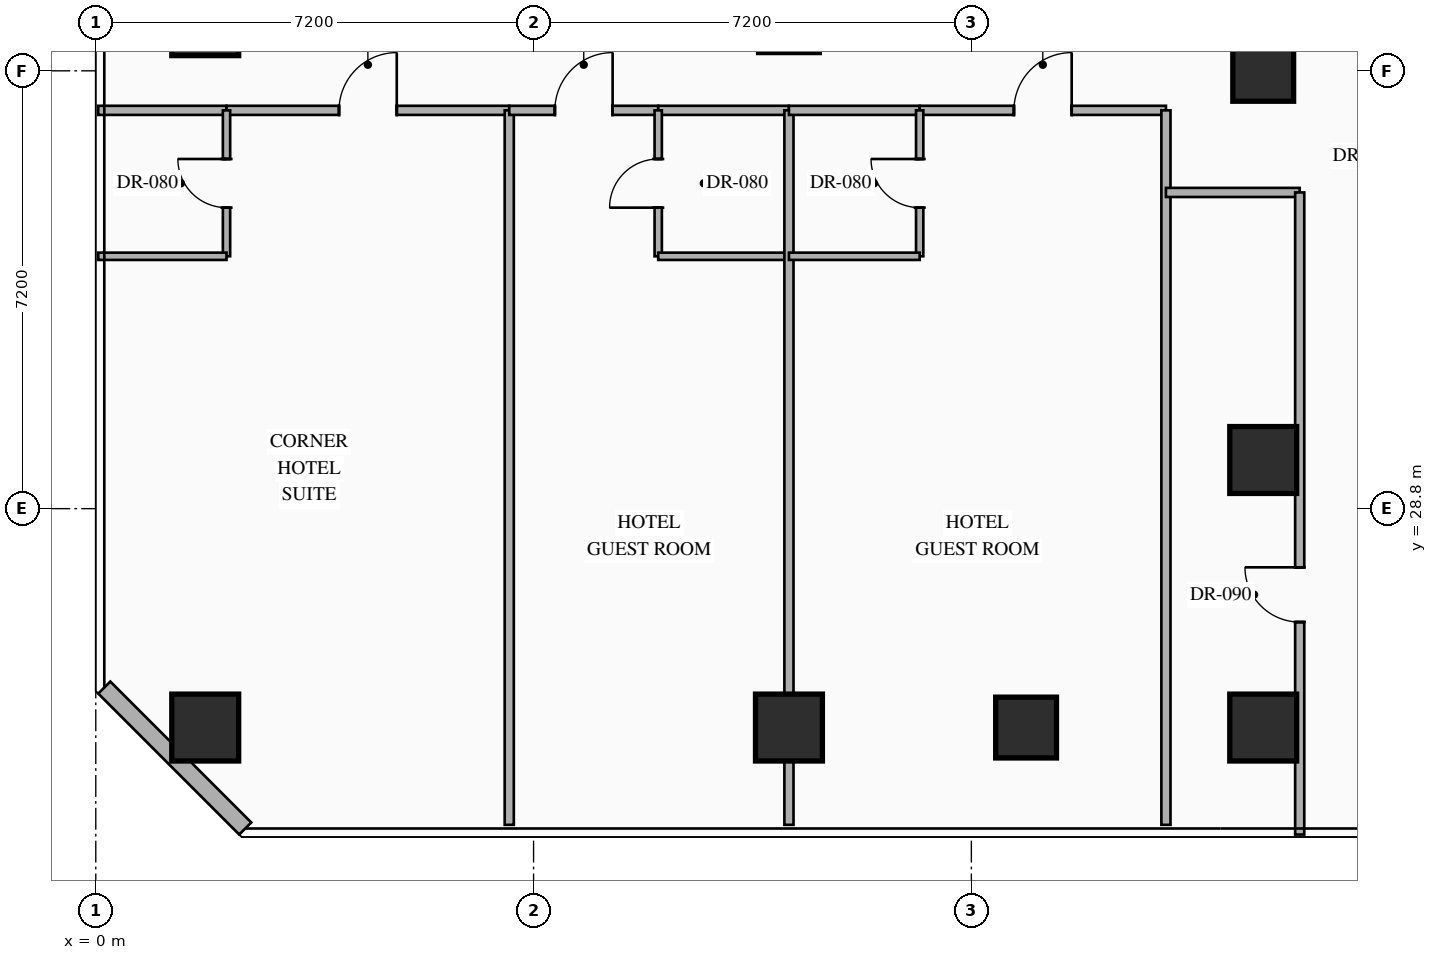
"""IFC4 building model, lengths in metres.
Left out: names, types, materials, properties, quantities, classifications, styles, units other than length and angle.
Written with IfcOpenShell. Run it as: python <this file> out.ifc"""

import sys

from ifc_helpers import new_model, si_unit, direction, frame, frame_2d, origin, origin_2d, place, context, subcontext, project, spatial, rectangle, hollow_rectangle, extrude, element, fill, save


model = new_model("IFC4")
c1 = context("Model", 3, precision=1e-05, world=origin(), true_north=direction((0.0, 1.0)))
c2 = subcontext(c1, "Body", "Model", "MODEL_VIEW")
j1 = project(units=[si_unit("LENGTHUNIT", "METRE"), si_unit("PLANEANGLEUNIT", "RADIAN")], contexts=[c1])
p1 = place(None, origin())
s1 = spatial("IfcSite", under=j1, at=p1, CompositionType="ELEMENT")
p2 = place(p1, origin())
s2 = spatial("IfcBuilding", under=s1, at=p2, CompositionType="ELEMENT")
p3 = place(p2, frame((0.0, 0.0, 63.4)))
s3 = spatial("IfcBuildingStorey", under=s2, at=p3, CompositionType="ELEMENT", Elevation=63.4)
for number, where, z_axis, x_axis in (
    (1, (1.8, 25.2, 0.0), (0.0, 0.0, 1.0), (1.0, 0.0, 0.0)),
    (2, (1.8, 36.8, 0.0), (0.0, 0.0, 1.0), (1.0, 0.0, 0.0)),
    (3, (11.4, 25.2, 0.0), (0.0, 0.0, 1.0), (1.0, 0.0, 0.0)),
    (4, (19.2, 25.2, 0.0), (0.0, 0.0, 1.0), (1.0, 0.0, 0.0)),
    (5, (19.2, 29.6, 0.0), (0.0, 0.0, 1.0), (1.0, 0.0, 0.0)),
):
    element("IfcColumn", number, at=place(p3, frame(where, z_axis=z_axis, x_axis=x_axis)), inside=s3, PredefinedType="COLUMN", context=c2, shape_type="SweptSolid", body=[
        extrude(hollow_rectangle(XDim=1.1, YDim=1.1, WallThickness=0.04, at=origin_2d()), origin(), (0.0, 0.0, 1.0), 3.35),
    ])
for number, where, z_axis, x_axis in (
    (6, (19.2, 36.0, 0.0), (0.0, 0.0, 1.0), (1.0, 0.0, 0.0)),
    (7, (15.3, 25.2, 0.0), (0.0, 0.0, 1.0), (1.0, 0.0, 0.0)),
):
    element("IfcColumn", number, at=place(p3, frame(where, z_axis=z_axis, x_axis=x_axis)), inside=s3, PredefinedType="COLUMN", context=c2, shape_type="SweptSolid", body=[
        extrude(hollow_rectangle(XDim=1.0, YDim=1.0, WallThickness=0.038, at=origin_2d()), origin(), (0.0, 0.0, 1.0), 3.35),
    ])
p4 = place(p3, frame((2.458, 23.54, 0.0), z_axis=(0.0, 0.0, 1.0), x_axis=(-0.707144017911, 0.707069542501, 0.0)))
e8 = element("IfcWall", 8, at=p4, inside=s3, PredefinedType="STANDARD", context=c2, shape_type="SweptSolid", body=[
    extrude(rectangle(XDim=3.278, YDim=0.28, at=frame_2d((1.639, 0.0))), origin(), (0.0, 0.0, 1.0), 3.13),
])
p5 = place(p3, frame((0.04, 35.35, 0.0), z_axis=(0.0, 0.0, 1.0), x_axis=(1.0, 0.0, 0.0)))
e9 = element("IfcWall", 9, at=p5, inside=s3, PredefinedType="PARTITIONING", context=c2, shape_type="SweptSolid", body=[
    extrude(rectangle(XDim=2.11, YDim=0.15, at=frame_2d((1.055, 0.0))), origin(), (0.0, 0.0, 1.0), 3.13),
])
p6 = place(p3, frame((2.15, 35.35, 0.0), z_axis=(0.0, 0.0, 1.0), x_axis=(1.0, 0.0, 0.0)))
e10 = element("IfcWall", 10, at=p6, inside=s3, PredefinedType="PARTITIONING", context=c2, shape_type="SweptSolid", body=[
    extrude(rectangle(XDim=4.65, YDim=0.15, at=frame_2d((2.325, 0.0))), origin(), (0.0, 0.0, 1.0), 3.13),
])
p7 = place(p6, frame((1.85, 0.0, 0.0)))
e11 = element("IfcOpeningElement", 11, at=p7, cuts=e10, PredefinedType="OPENING", context=c2, shape_type="SweptSolid", body=[
    extrude(rectangle(XDim=0.95, YDim=2.15, at=frame_2d((0.475, 1.075))), frame((0.0, 0.085, 0.0), z_axis=(0.0, -1.0, 0.0), x_axis=(1.0, 0.0, 0.0)), (0.0, 0.0, 1.0), 0.17),
])
p8 = place(p3, frame((2.15, 32.95, 0.0), z_axis=(0.0, 0.0, 1.0), x_axis=(0.0, 1.0, 0.0)))
e12 = element("IfcWall", 12, at=p8, inside=s3, PredefinedType="PARTITIONING", context=c2, shape_type="SweptSolid", body=[
    extrude(rectangle(XDim=2.4, YDim=0.12, at=frame_2d((1.2, 0.0))), origin(), (0.0, 0.0, 1.0), 3.13),
])
p9 = place(p8, frame((0.8, 0.0, 0.0)))
e13 = element("IfcOpeningElement", 13, at=p9, cuts=e12, PredefinedType="OPENING", context=c2, shape_type="SweptSolid", body=[
    extrude(rectangle(XDim=0.8, YDim=2.06, at=frame_2d((0.4, 1.03))), frame((0.0, 0.07, 0.0), z_axis=(0.0, -1.0, 0.0), x_axis=(1.0, 0.0, 0.0)), (0.0, 0.0, 1.0), 0.14),
])
p10 = place(p3, frame((0.04, 32.95, 0.0), z_axis=(0.0, 0.0, 1.0), x_axis=(1.0, 0.0, 0.0)))
e14 = element("IfcWall", 14, at=p10, inside=s3, PredefinedType="PARTITIONING", context=c2, shape_type="SweptSolid", body=[
    extrude(rectangle(XDim=2.11, YDim=0.12, at=frame_2d((1.055, 0.0))), origin(), (0.0, 0.0, 1.0), 3.13),
])
p11 = place(p3, frame((6.8, 23.6, 0.0), z_axis=(0.0, 0.0, 1.0), x_axis=(0.0, 1.0, 0.0)))
e15 = element("IfcWall", 15, at=p11, inside=s3, PredefinedType="PARTITIONING", context=c2, shape_type="SweptSolid", body=[
    extrude(rectangle(XDim=11.75, YDim=0.15, at=frame_2d((5.875, 0.0))), origin(), (0.0, 0.0, 1.0), 3.13),
])
p12 = place(p3, frame((6.8, 35.35, 0.0), z_axis=(0.0, 0.0, 1.0), x_axis=(1.0, 0.0, 0.0)))
e16 = element("IfcWall", 16, at=p12, inside=s3, PredefinedType="PARTITIONING", context=c2, shape_type="SweptSolid", body=[
    extrude(rectangle(XDim=2.45, YDim=0.15, at=frame_2d((1.225, 0.0))), origin(), (0.0, 0.0, 1.0), 3.13),
])
p13 = place(p12, frame((0.75, 0.0, 0.0)))
e17 = element("IfcOpeningElement", 17, at=p13, cuts=e16, PredefinedType="OPENING", context=c2, shape_type="SweptSolid", body=[
    extrude(rectangle(XDim=0.95, YDim=2.15, at=frame_2d((0.475, 1.075))), frame((0.0, 0.085, 0.0), z_axis=(0.0, -1.0, 0.0), x_axis=(1.0, 0.0, 0.0)), (0.0, 0.0, 1.0), 0.17),
])
p14 = place(p3, frame((9.25, 35.35, 0.0), z_axis=(0.0, 0.0, 1.0), x_axis=(1.0, 0.0, 0.0)))
e18 = element("IfcWall", 18, at=p14, inside=s3, PredefinedType="PARTITIONING", context=c2, shape_type="SweptSolid", body=[
    extrude(rectangle(XDim=2.15, YDim=0.15, at=frame_2d((1.075, 0.0))), origin(), (0.0, 0.0, 1.0), 3.13),
])
p15 = place(p3, frame((9.25, 32.95, 0.0), z_axis=(0.0, 0.0, 1.0), x_axis=(0.0, 1.0, 0.0)))
e19 = element("IfcWall", 19, at=p15, inside=s3, PredefinedType="PARTITIONING", context=c2, shape_type="SweptSolid", body=[
    extrude(rectangle(XDim=2.4, YDim=0.12, at=frame_2d((1.2, 0.0))), origin(), (0.0, 0.0, 1.0), 3.13),
])
p16 = place(p15, frame((0.8, 0.0, 0.0)))
e20 = element("IfcOpeningElement", 20, at=p16, cuts=e19, PredefinedType="OPENING", context=c2, shape_type="SweptSolid", body=[
    extrude(rectangle(XDim=0.8, YDim=2.06, at=frame_2d((0.4, 1.03))), frame((0.0, 0.07, 0.0), z_axis=(0.0, -1.0, 0.0), x_axis=(1.0, 0.0, 0.0)), (0.0, 0.0, 1.0), 0.14),
])
p17 = place(p3, frame((9.25, 32.95, 0.0), z_axis=(0.0, 0.0, 1.0), x_axis=(1.0, 0.0, 0.0)))
e21 = element("IfcWall", 21, at=p17, inside=s3, PredefinedType="PARTITIONING", context=c2, shape_type="SweptSolid", body=[
    extrude(rectangle(XDim=2.15, YDim=0.12, at=frame_2d((1.075, 0.0))), origin(), (0.0, 0.0, 1.0), 3.13),
])
p18 = place(p3, frame((11.4, 23.6, 0.0), z_axis=(0.0, 0.0, 1.0), x_axis=(0.0, 1.0, 0.0)))
e22 = element("IfcWall", 22, at=p18, inside=s3, PredefinedType="PARTITIONING", context=c2, shape_type="SweptSolid", body=[
    extrude(rectangle(XDim=11.75, YDim=0.15, at=frame_2d((5.875, 0.0))), origin(), (0.0, 0.0, 1.0), 2.425),
])
p19 = place(p3, frame((11.4, 35.35, 0.0), z_axis=(0.0, 0.0, 1.0), x_axis=(1.0, 0.0, 0.0)))
e23 = element("IfcWall", 23, at=p19, inside=s3, PredefinedType="PARTITIONING", context=c2, shape_type="SweptSolid", body=[
    extrude(rectangle(XDim=2.15, YDim=0.15, at=frame_2d((1.075, 0.0))), origin(), (0.0, 0.0, 1.0), 3.13),
])
p20 = place(p3, frame((13.55, 35.35, 0.0), z_axis=(0.0, 0.0, 1.0), x_axis=(1.0, 0.0, 0.0)))
e24 = element("IfcWall", 24, at=p20, inside=s3, PredefinedType="PARTITIONING", context=c2, shape_type="SweptSolid", body=[
    extrude(rectangle(XDim=4.05, YDim=0.15, at=frame_2d((2.025, 0.0))), origin(), (0.0, 0.0, 1.0), 3.13),
])
p21 = place(p20, frame((1.55, 0.0, 0.0)))
e25 = element("IfcOpeningElement", 25, at=p21, cuts=e24, PredefinedType="OPENING", context=c2, shape_type="SweptSolid", body=[
    extrude(rectangle(XDim=0.95, YDim=2.15, at=frame_2d((0.475, 1.075))), frame((0.0, 0.085, 0.0), z_axis=(0.0, -1.0, 0.0), x_axis=(1.0, 0.0, 0.0)), (0.0, 0.0, 1.0), 0.17),
])
p22 = place(p3, frame((13.55, 32.95, 0.0), z_axis=(0.0, 0.0, 1.0), x_axis=(0.0, 1.0, 0.0)))
e26 = element("IfcWall", 26, at=p22, inside=s3, PredefinedType="PARTITIONING", context=c2, shape_type="SweptSolid", body=[
    extrude(rectangle(XDim=2.4, YDim=0.12, at=frame_2d((1.2, 0.0))), origin(), (0.0, 0.0, 1.0), 3.13),
])
p23 = place(p22, frame((0.8, 0.0, 0.0)))
e27 = element("IfcOpeningElement", 27, at=p23, cuts=e26, PredefinedType="OPENING", context=c2, shape_type="SweptSolid", body=[
    extrude(rectangle(XDim=0.8, YDim=2.06, at=frame_2d((0.4, 1.03))), frame((0.0, 0.07, 0.0), z_axis=(0.0, -1.0, 0.0), x_axis=(1.0, 0.0, 0.0)), (0.0, 0.0, 1.0), 0.14),
])
p24 = place(p3, frame((11.4, 32.95, 0.0), z_axis=(0.0, 0.0, 1.0), x_axis=(1.0, 0.0, 0.0)))
e28 = element("IfcWall", 28, at=p24, inside=s3, PredefinedType="PARTITIONING", context=c2, shape_type="SweptSolid", body=[
    extrude(rectangle(XDim=2.15, YDim=0.12, at=frame_2d((1.075, 0.0))), origin(), (0.0, 0.0, 1.0), 3.13),
])
p25 = place(p3, frame((17.6, 23.6, 0.0), z_axis=(0.0, 0.0, 1.0), x_axis=(0.0, 1.0, 0.0)))
e29 = element("IfcWall", 29, at=p25, inside=s3, PredefinedType="PARTITIONING", context=c2, shape_type="SweptSolid", body=[
    extrude(rectangle(XDim=11.75, YDim=0.15, at=frame_2d((5.875, 0.0))), origin(), (0.0, 0.0, 1.0), 3.13),
])
p26 = place(p3, frame((17.6, 34.0, 0.0), z_axis=(0.0, 0.0, 1.0), x_axis=(1.0, 0.0, 0.0)))
e30 = element("IfcWall", 30, at=p26, inside=s3, PredefinedType="PARTITIONING", context=c2, shape_type="SweptSolid", body=[
    extrude(rectangle(XDim=2.2, YDim=0.15, at=frame_2d((1.1, 0.0))), origin(), (0.0, 0.0, 1.0), 3.13),
])
p27 = place(p3, frame((19.8, 23.44, 0.0), z_axis=(0.0, 0.0, 1.0), x_axis=(0.0, 1.0, 0.0)))
e31 = element("IfcWall", 31, at=p27, inside=s3, PredefinedType="PARTITIONING", context=c2, shape_type="SweptSolid", body=[
    extrude(rectangle(XDim=10.56, YDim=0.15, at=frame_2d((5.28, 0.0))), origin(), (0.0, 0.0, 1.0), 3.13),
])
p28 = place(p27, frame((3.495, 0.0, 0.0)))
e32 = element("IfcOpeningElement", 32, at=p28, cuts=e31, PredefinedType="OPENING", context=c2, shape_type="SweptSolid", body=[
    extrude(rectangle(XDim=0.9, YDim=2.15, at=frame_2d((0.45, 1.075))), frame((0.0, 0.085, 0.0), z_axis=(0.0, -1.0, 0.0), x_axis=(1.0, 0.0, 0.0)), (0.0, 0.0, 1.0), 0.17),
])
p29 = place(p7, origin())
e33 = element("IfcDoor", 33, at=p29, inside=s3, OperationType="SINGLE_SWING_RIGHT", PredefinedType="DOOR", context=c2, shape_type="SweptSolid", body=[
    extrude(rectangle(XDim=0.95, YDim=2.15, at=frame_2d((0.475, 1.075))), frame((0.0, 0.025, 0.0), z_axis=(0.0, -1.0, 0.0), x_axis=(1.0, 0.0, 0.0)), (0.0, 0.0, 1.0), 0.05),
])
fill(e11, e33)
p30 = place(p9, origin())
e34 = element("IfcDoor", 34, at=p30, inside=s3, OperationType="SINGLE_SWING_RIGHT", PredefinedType="DOOR", context=c2, shape_type="SweptSolid", body=[
    extrude(rectangle(XDim=0.8, YDim=2.06, at=frame_2d((0.4, 1.03))), frame((0.0, 0.025, 0.0), z_axis=(0.0, -1.0, 0.0), x_axis=(1.0, 0.0, 0.0)), (0.0, 0.0, 1.0), 0.05),
])
fill(e13, e34)
p31 = place(p13, origin())
e35 = element("IfcDoor", 35, at=p31, inside=s3, OperationType="SINGLE_SWING_RIGHT", PredefinedType="DOOR", context=c2, shape_type="SweptSolid", body=[
    extrude(rectangle(XDim=0.95, YDim=2.15, at=frame_2d((0.475, 1.075))), frame((0.0, 0.025, 0.0), z_axis=(0.0, -1.0, 0.0), x_axis=(1.0, 0.0, 0.0)), (0.0, 0.0, 1.0), 0.05),
])
fill(e17, e35)
p32 = place(p16, origin())
e36 = element("IfcDoor", 36, at=p32, inside=s3, OperationType="SINGLE_SWING_LEFT", PredefinedType="DOOR", context=c2, shape_type="SweptSolid", body=[
    extrude(rectangle(XDim=0.8, YDim=2.06, at=frame_2d((0.4, 1.03))), frame((0.0, 0.025, 0.0), z_axis=(0.0, -1.0, 0.0), x_axis=(1.0, 0.0, 0.0)), (0.0, 0.0, 1.0), 0.05),
])
fill(e20, e36)
p33 = place(p21, origin())
e37 = element("IfcDoor", 37, at=p33, inside=s3, OperationType="SINGLE_SWING_RIGHT", PredefinedType="DOOR", context=c2, shape_type="SweptSolid", body=[
    extrude(rectangle(XDim=0.95, YDim=2.15, at=frame_2d((0.475, 1.075))), frame((0.0, 0.025, 0.0), z_axis=(0.0, -1.0, 0.0), x_axis=(1.0, 0.0, 0.0)), (0.0, 0.0, 1.0), 0.05),
])
fill(e25, e37)
p34 = place(p23, origin())
e38 = element("IfcDoor", 38, at=p34, inside=s3, OperationType="SINGLE_SWING_RIGHT", PredefinedType="DOOR", context=c2, shape_type="SweptSolid", body=[
    extrude(rectangle(XDim=0.8, YDim=2.06, at=frame_2d((0.4, 1.03))), frame((0.0, 0.025, 0.0), z_axis=(0.0, -1.0, 0.0), x_axis=(1.0, 0.0, 0.0)), (0.0, 0.0, 1.0), 0.05),
])
fill(e27, e38)
p35 = place(p28, origin())
e39 = element("IfcDoor", 39, at=p35, inside=s3, OperationType="SINGLE_SWING_RIGHT", PredefinedType="DOOR", context=c2, shape_type="SweptSolid", body=[
    extrude(rectangle(XDim=0.9, YDim=2.15, at=frame_2d((0.45, 1.075))), frame((0.0, 0.025, 0.0), z_axis=(0.0, -1.0, 0.0), x_axis=(1.0, 0.0, 0.0)), (0.0, 0.0, 1.0), 0.05),
])
fill(e32, e39)
save(model, sys.argv[1])
